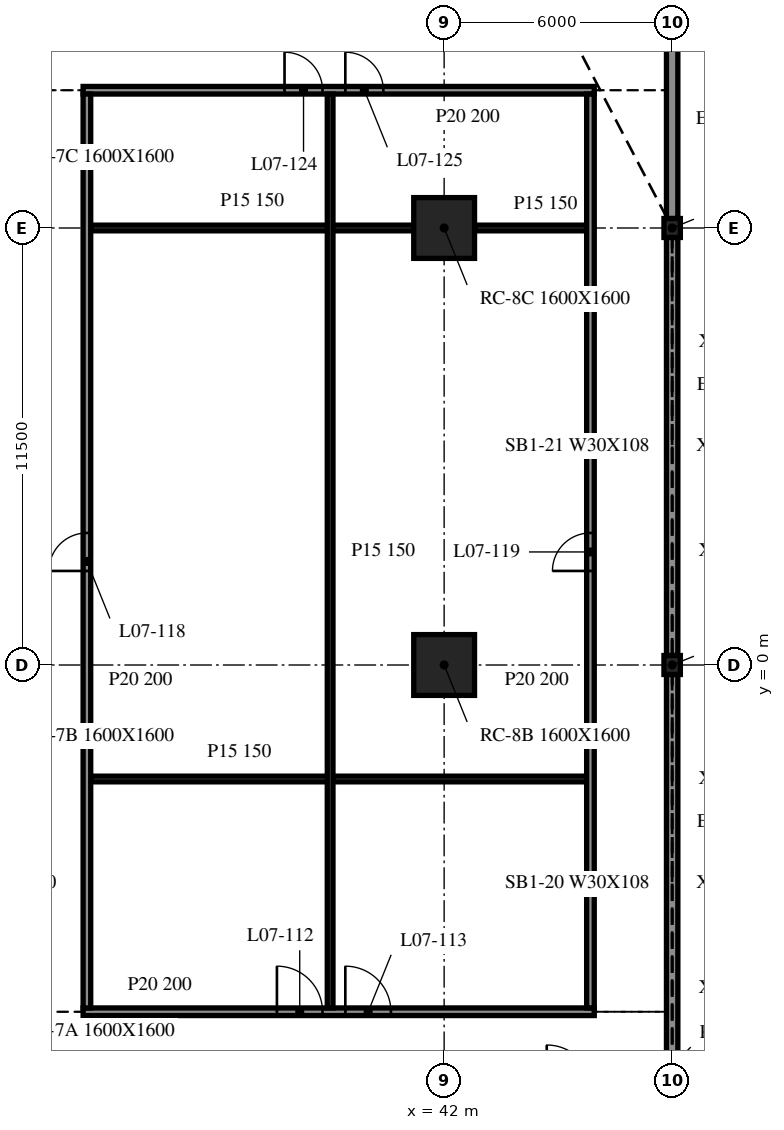
"""IFC4 building model, lengths in metres.
Left out: names, types, materials, properties, quantities, classifications, styles, units other than length and angle.
Written with IfcOpenShell. Run it as: python <this file> out.ifc"""

import sys

from ifc_helpers import new_model, si_unit, direction, frame, frame_2d, origin, origin_2d, place, context, subcontext, project, spatial, rectangle, i_section, extrude, element, fill, save


model = new_model("IFC4")
c1 = context("Model", 3, precision=1e-05, world=origin(), true_north=direction((0.0, 1.0)))
c2 = subcontext(c1, "Body", "Model", "MODEL_VIEW")
j1 = project(units=[si_unit("LENGTHUNIT", "METRE"), si_unit("PLANEANGLEUNIT", "RADIAN")], contexts=[c1])
p1 = place(None, origin())
s1 = spatial("IfcSite", under=j1, at=p1, CompositionType="ELEMENT")
p2 = place(p1, origin())
s2 = spatial("IfcBuilding", under=s1, at=p2, CompositionType="ELEMENT")
p3 = place(p2, frame((0.0, 0.0, 33.0)))
s3 = spatial("IfcBuildingStorey", under=s2, at=p3, CompositionType="ELEMENT", Elevation=33.0)
for number, where, z_axis, x_axis in (
    (1, (42.0, 0.0, -0.34), (0.0, 0.0, 1.0), (1.0, 0.0, 0.0)),
    (2, (42.0, 11.5, -0.34), (0.0, 0.0, 1.0), (1.0, 0.0, 0.0)),
):
    element("IfcColumn", number, at=place(p3, frame(where, z_axis=z_axis, x_axis=x_axis)), inside=s3, PredefinedType="COLUMN", context=c2, shape_type="SweptSolid", body=[
        extrude(rectangle(XDim=1.6, YDim=1.6, at=origin_2d()), origin(), (0.0, 0.0, 1.0), 4.3),
    ])
for number, where, z_axis, x_axis in (
    (3, (48.0, 0.0, -0.34), (0.0, 0.0, 1.0), (1.0, 0.0, 0.0)),
    (4, (48.0, 11.5, -0.34), (0.0, 0.0, 1.0), (1.0, 0.0, 0.0)),
):
    element("IfcColumn", number, at=place(p3, frame(where, z_axis=z_axis, x_axis=x_axis)), inside=s3, PredefinedType="COLUMN", context=c2, shape_type="SweptSolid", body=[
        extrude(i_section(OverallWidth=0.432, OverallDepth=0.498, WebThickness=0.056, FlangeThickness=0.089, at=origin_2d()), origin(), (0.0, 0.0, 1.0), 4.3),
    ])
for number, where, z_axis, x_axis in (
    (5, (48.0, -11.251, 0.0), (0.0, 0.0, 1.0), (0.0, 1.0, 0.0)),
    (6, (48.0, 0.249, 0.0), (0.0, 0.0, 1.0), (0.0, 1.0, 0.0)),
):
    element("IfcWall", number, at=place(p3, frame(where, z_axis=z_axis, x_axis=x_axis)), inside=s3, PredefinedType="NOTDEFINED", context=c2, shape_type="SweptSolid", body=[
        extrude(rectangle(XDim=11.002, YDim=0.3, at=frame_2d((5.501, 0.0))), origin(), (0.0, 0.0, 1.0), 3.203),
    ])
p4 = place(p3, frame((48.0, 11.749, 0.0), z_axis=(0.0, 0.0, 1.0), x_axis=(0.0, 1.0, 0.0)))
e7 = element("IfcWall", 7, at=p4, inside=s3, PredefinedType="NOTDEFINED", context=c2, shape_type="SweptSolid", body=[
    extrude(rectangle(XDim=5.251, YDim=0.3, at=frame_2d((2.625, 0.0))), origin(), (0.0, 0.0, 1.0), 3.203),
])
p5 = place(p3, frame((32.5, -9.125, 0.0), z_axis=(0.0, 0.0, 1.0), x_axis=(1.0, 0.0, 0.0)))
e8 = element("IfcWall", 8, at=p5, inside=s3, PredefinedType="PARTITIONING", context=c2, shape_type="SweptSolid", body=[
    extrude(rectangle(XDim=13.45, YDim=0.2, at=frame_2d((6.725, 0.0))), origin(), (0.0, 0.0, 1.0), 3.96),
])
p6 = place(p5, frame((5.1, 0.0, 0.0)))
e9 = element("IfcOpeningElement", 9, at=p6, cuts=e8, PredefinedType="OPENING", context=c2, shape_type="SweptSolid", body=[
    extrude(rectangle(XDim=1.2, YDim=2.1, at=frame_2d((0.6, 1.05))), frame((0.0, 0.11, 0.0), z_axis=(0.0, -1.0, 0.0), x_axis=(1.0, 0.0, 0.0)), (0.0, 0.0, 1.0), 0.22),
])
p7 = place(p5, frame((6.9, 0.0, 0.0)))
e10 = element("IfcOpeningElement", 10, at=p7, cuts=e8, PredefinedType="OPENING", context=c2, shape_type="SweptSolid", body=[
    extrude(rectangle(XDim=1.2, YDim=2.1, at=frame_2d((0.6, 1.05))), frame((0.0, 0.11, 0.0), z_axis=(0.0, -1.0, 0.0), x_axis=(1.0, 0.0, 0.0)), (0.0, 0.0, 1.0), 0.22),
])
p8 = place(p3, frame((32.7, -3.0, 0.0), z_axis=(0.0, 0.0, 1.0), x_axis=(1.0, 0.0, 0.0)))
e11 = element("IfcWall", 11, at=p8, inside=s3, PredefinedType="PARTITIONING", context=c2, shape_type="SweptSolid", body=[
    extrude(rectangle(XDim=13.05, YDim=0.15, at=frame_2d((6.525, 0.0))), origin(), (0.0, 0.0, 1.0), 3.96),
])
p9 = place(p3, frame((32.7, 11.5, 0.0), z_axis=(0.0, 0.0, 1.0), x_axis=(1.0, 0.0, 0.0)))
e12 = element("IfcWall", 12, at=p9, inside=s3, PredefinedType="PARTITIONING", context=c2, shape_type="SweptSolid", body=[
    extrude(rectangle(XDim=8.5, YDim=0.15, at=frame_2d((4.25, 0.0))), origin(), (0.0, 0.0, 1.0), 3.96),
])
p10 = place(p3, frame((42.8, 11.5, 0.0), z_axis=(0.0, 0.0, 1.0), x_axis=(1.0, 0.0, 0.0)))
e13 = element("IfcWall", 13, at=p10, inside=s3, PredefinedType="PARTITIONING", context=c2, shape_type="SweptSolid", body=[
    extrude(rectangle(XDim=2.95, YDim=0.15, at=frame_2d((1.475, 0.0))), origin(), (0.0, 0.0, 1.0), 3.96),
])
p11 = place(p3, frame((32.5, 15.125, 0.0), z_axis=(0.0, 0.0, 1.0), x_axis=(1.0, 0.0, 0.0)))
e14 = element("IfcWall", 14, at=p11, inside=s3, PredefinedType="PARTITIONING", context=c2, shape_type="SweptSolid", body=[
    extrude(rectangle(XDim=13.45, YDim=0.2, at=frame_2d((6.725, 0.0))), origin(), (0.0, 0.0, 1.0), 3.96),
])
p12 = place(p11, frame((5.3, 0.0, 0.0)))
e15 = element("IfcOpeningElement", 15, at=p12, cuts=e14, PredefinedType="OPENING", context=c2, shape_type="SweptSolid", body=[
    extrude(rectangle(XDim=1.0, YDim=2.1, at=frame_2d((0.5, 1.05))), frame((0.0, 0.11, 0.0), z_axis=(0.0, -1.0, 0.0), x_axis=(1.0, 0.0, 0.0)), (0.0, 0.0, 1.0), 0.22),
])
p13 = place(p11, frame((6.9, 0.0, 0.0)))
e16 = element("IfcOpeningElement", 16, at=p13, cuts=e14, PredefinedType="OPENING", context=c2, shape_type="SweptSolid", body=[
    extrude(rectangle(XDim=1.0, YDim=2.1, at=frame_2d((0.5, 1.05))), frame((0.0, 0.11, 0.0), z_axis=(0.0, -1.0, 0.0), x_axis=(1.0, 0.0, 0.0)), (0.0, 0.0, 1.0), 0.22),
])
p14 = place(p3, frame((32.6, -9.025, 0.0), z_axis=(0.0, 0.0, 1.0), x_axis=(0.0, 1.0, 0.0)))
e17 = element("IfcWall", 17, at=p14, inside=s3, PredefinedType="PARTITIONING", context=c2, shape_type="SweptSolid", body=[
    extrude(rectangle(XDim=24.05, YDim=0.2, at=frame_2d((12.025, 0.0))), origin(), (0.0, 0.0, 1.0), 3.96),
])
p15 = place(p14, frame((11.5, 0.0, 0.0)))
e18 = element("IfcOpeningElement", 18, at=p15, cuts=e17, PredefinedType="OPENING", context=c2, shape_type="SweptSolid", body=[
    extrude(rectangle(XDim=1.0, YDim=2.1, at=frame_2d((0.5, 1.05))), frame((0.0, 0.11, 0.0), z_axis=(0.0, -1.0, 0.0), x_axis=(1.0, 0.0, 0.0)), (0.0, 0.0, 1.0), 0.22),
])
p16 = place(p3, frame((39.0, -9.025, 0.0), z_axis=(0.0, 0.0, 1.0), x_axis=(0.0, 1.0, 0.0)))
e19 = element("IfcWall", 19, at=p16, inside=s3, PredefinedType="PARTITIONING", context=c2, shape_type="SweptSolid", body=[
    extrude(rectangle(XDim=24.05, YDim=0.15, at=frame_2d((12.025, 0.0))), origin(), (0.0, 0.0, 1.0), 3.96),
])
p17 = place(p3, frame((45.85, -9.025, 0.0), z_axis=(0.0, 0.0, 1.0), x_axis=(0.0, 1.0, 0.0)))
e20 = element("IfcWall", 20, at=p17, inside=s3, PredefinedType="PARTITIONING", context=c2, shape_type="SweptSolid", body=[
    extrude(rectangle(XDim=24.05, YDim=0.2, at=frame_2d((12.025, 0.0))), origin(), (0.0, 0.0, 1.0), 3.96),
])
p18 = place(p17, frame((11.5, 0.0, 0.0)))
e21 = element("IfcOpeningElement", 21, at=p18, cuts=e20, PredefinedType="OPENING", context=c2, shape_type="SweptSolid", body=[
    extrude(rectangle(XDim=1.0, YDim=2.1, at=frame_2d((0.5, 1.05))), frame((0.0, 0.11, 0.0), z_axis=(0.0, -1.0, 0.0), x_axis=(1.0, 0.0, 0.0)), (0.0, 0.0, 1.0), 0.22),
])
p19 = place(p6, origin())
e22 = element("IfcDoor", 22, at=p19, inside=s3, OperationType="SINGLE_SWING_LEFT", PredefinedType="DOOR", context=c2, shape_type="SweptSolid", body=[
    extrude(rectangle(XDim=1.2, YDim=2.1, at=frame_2d((0.6, 1.05))), frame((0.0, 0.025, 0.0), z_axis=(0.0, -1.0, 0.0), x_axis=(1.0, 0.0, 0.0)), (0.0, 0.0, 1.0), 0.05),
])
fill(e9, e22)
p20 = place(p7, origin())
e23 = element("IfcDoor", 23, at=p20, inside=s3, OperationType="SINGLE_SWING_RIGHT", PredefinedType="DOOR", context=c2, shape_type="SweptSolid", body=[
    extrude(rectangle(XDim=1.2, YDim=2.1, at=frame_2d((0.6, 1.05))), frame((0.0, 0.025, 0.0), z_axis=(0.0, -1.0, 0.0), x_axis=(1.0, 0.0, 0.0)), (0.0, 0.0, 1.0), 0.05),
])
fill(e10, e23)
p21 = place(p15, origin())
e24 = element("IfcDoor", 24, at=p21, inside=s3, OperationType="SINGLE_SWING_RIGHT", PredefinedType="DOOR", context=c2, shape_type="SweptSolid", body=[
    extrude(rectangle(XDim=1.0, YDim=2.1, at=frame_2d((0.5, 1.05))), frame((0.0, 0.025, 0.0), z_axis=(0.0, -1.0, 0.0), x_axis=(1.0, 0.0, 0.0)), (0.0, 0.0, 1.0), 0.05),
])
fill(e18, e24)
p22 = place(p18, origin())
e25 = element("IfcDoor", 25, at=p22, inside=s3, OperationType="SINGLE_SWING_LEFT", PredefinedType="DOOR", context=c2, shape_type="SweptSolid", body=[
    extrude(rectangle(XDim=1.0, YDim=2.1, at=frame_2d((0.5, 1.05))), frame((0.0, 0.025, 0.0), z_axis=(0.0, -1.0, 0.0), x_axis=(1.0, 0.0, 0.0)), (0.0, 0.0, 1.0), 0.05),
])
fill(e21, e25)
p23 = place(p12, origin())
e26 = element("IfcDoor", 26, at=p23, inside=s3, OperationType="SINGLE_SWING_RIGHT", PredefinedType="DOOR", context=c2, shape_type="SweptSolid", body=[
    extrude(rectangle(XDim=1.0, YDim=2.1, at=frame_2d((0.5, 1.05))), frame((0.0, 0.025, 0.0), z_axis=(0.0, -1.0, 0.0), x_axis=(1.0, 0.0, 0.0)), (0.0, 0.0, 1.0), 0.05),
])
fill(e15, e26)
p24 = place(p13, origin())
e27 = element("IfcDoor", 27, at=p24, inside=s3, OperationType="SINGLE_SWING_LEFT", PredefinedType="DOOR", context=c2, shape_type="SweptSolid", body=[
    extrude(rectangle(XDim=1.0, YDim=2.1, at=frame_2d((0.5, 1.05))), frame((0.0, 0.025, 0.0), z_axis=(0.0, -1.0, 0.0), x_axis=(1.0, 0.0, 0.0)), (0.0, 0.0, 1.0), 0.05),
])
fill(e16, e27)
save(model, sys.argv[1])
